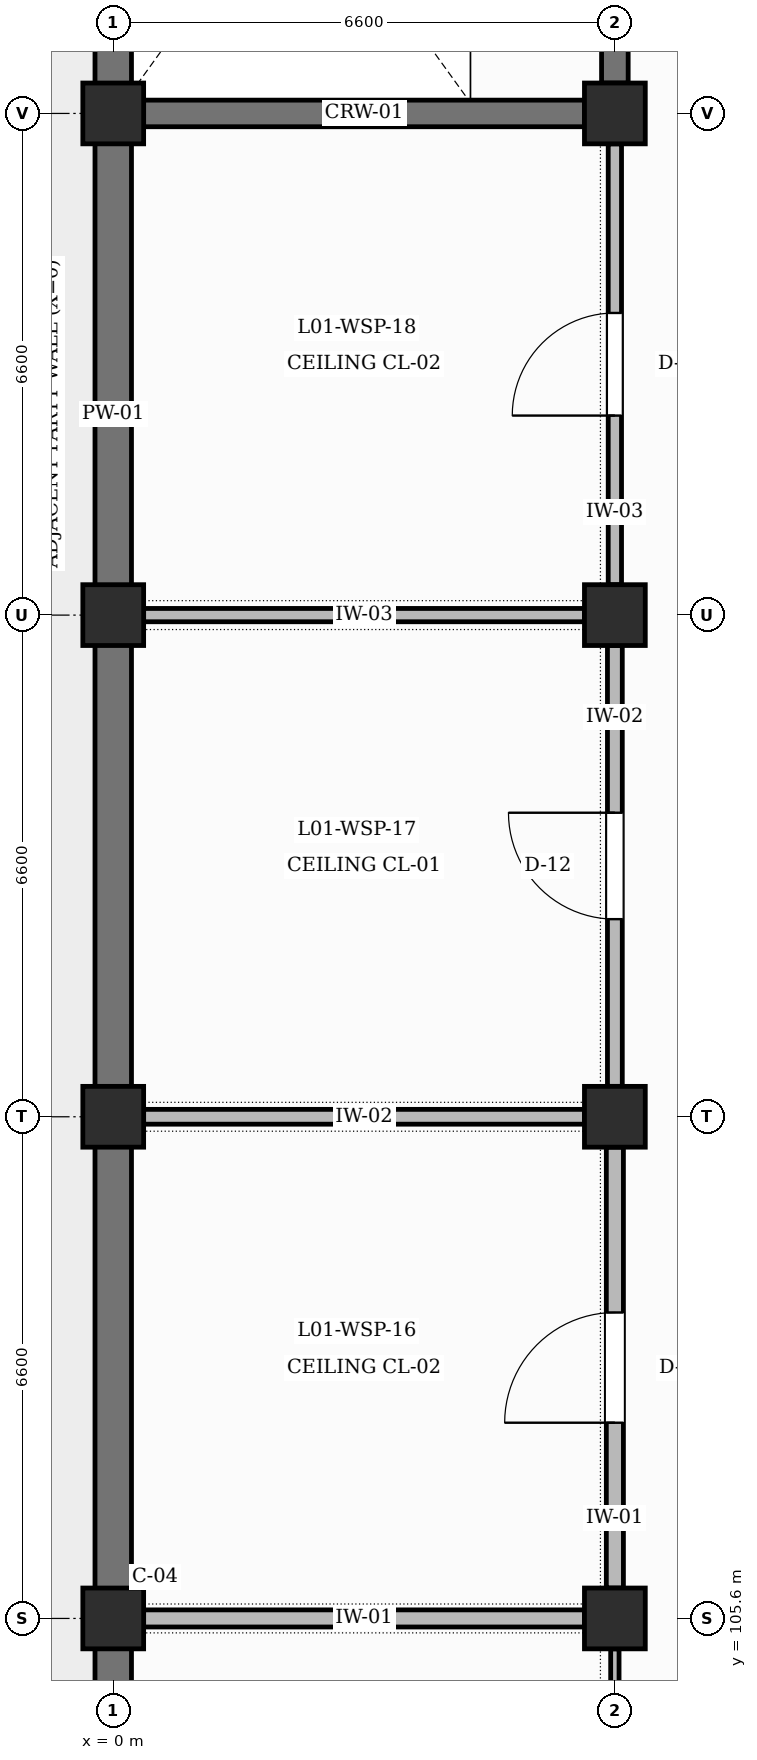
"""IFC4 building model, lengths in metres.
Left out: names, types, materials, properties, quantities, classifications, styles, units other than length and angle.
Written with IfcOpenShell. Run it as: python <this file> out.ifc"""

import sys

from ifc_helpers import new_model, si_unit, direction, frame, frame_2d, origin, origin_2d, place, context, subcontext, project, spatial, rectangle, extrude, element, fill, save


model = new_model("IFC4")
c1 = context("Model", 3, precision=1e-05, world=origin(), true_north=direction((0.0, 1.0)))
c2 = subcontext(c1, "Body", "Model", "MODEL_VIEW")
j1 = project(units=[si_unit("LENGTHUNIT", "METRE"), si_unit("PLANEANGLEUNIT", "RADIAN")], contexts=[c1])
p1 = place(None, origin())
s1 = spatial("IfcSite", under=j1, at=p1, CompositionType="ELEMENT")
p2 = place(p1, origin())
s2 = spatial("IfcBuilding", under=s1, at=p2, CompositionType="ELEMENT")
p3 = place(p2, frame((0.0, 0.0, 5.4)))
s3 = spatial("IfcBuildingStorey", under=s2, at=p3, CompositionType="ELEMENT", Elevation=5.4)
for number, where, z_axis, x_axis in (
    (1, (0.0, 105.6, 0.0), (0.0, 0.0, 1.0), (1.0, 0.0, 0.0)),
    (2, (0.0, 112.2, 0.0), (0.0, 0.0, 1.0), (1.0, 0.0, 0.0)),
    (3, (0.0, 118.8, 0.0), (0.0, 0.0, 1.0), (1.0, 0.0, 0.0)),
    (4, (0.0, 125.4, 0.0), (0.0, 0.0, 1.0), (1.0, 0.0, 0.0)),
    (5, (6.6, 105.6, 0.0), (0.0, 0.0, 1.0), (1.0, 0.0, 0.0)),
    (6, (6.6, 112.2, 0.0), (0.0, 0.0, 1.0), (1.0, 0.0, 0.0)),
    (7, (6.6, 118.8, 0.0), (0.0, 0.0, 1.0), (1.0, 0.0, 0.0)),
    (8, (6.6, 125.4, 0.0), (0.0, 0.0, 1.0), (1.0, 0.0, 0.0)),
):
    element("IfcColumn", number, at=place(p3, frame(where, z_axis=z_axis, x_axis=x_axis)), inside=s3, PredefinedType="COLUMN", context=c2, shape_type="SweptSolid", body=[
        extrude(rectangle(XDim=0.8, YDim=0.8, at=origin_2d()), origin(), (0.0, 0.0, 1.0), 4.8),
    ])
for number, where, z_axis, x_axis in (
    (9, (0.0, 99.4, 0.0), (0.0, 0.0, 1.0), (0.0, 1.0, 0.0)),
    (10, (0.0, 106.0, 0.0), (0.0, 0.0, 1.0), (0.0, 1.0, 0.0)),
):
    element("IfcWall", number, at=place(p3, frame(where, z_axis=z_axis, x_axis=x_axis)), inside=s3, PredefinedType="SOLIDWALL", context=c2, shape_type="SweptSolid", body=[
        extrude(rectangle(XDim=5.8, YDim=0.48, at=frame_2d((2.9, 0.0))), origin(), (0.0, 0.0, 1.0), 3.85),
    ])
p4 = place(p3, frame((0.0, 112.6, 0.0), z_axis=(0.0, 0.0, 1.0), x_axis=(0.0, 1.0, 0.0)))
e11 = element("IfcWall", 11, at=p4, inside=s3, PredefinedType="SOLIDWALL", context=c2, shape_type="SweptSolid", body=[
    extrude(rectangle(XDim=5.8, YDim=0.48, at=frame_2d((2.9, 0.0))), origin(), (0.0, 0.0, 1.0), 3.85),
])
for number, where, z_axis, x_axis in (
    (12, (0.0, 119.2, 0.0), (0.0, 0.0, 1.0), (0.0, 1.0, 0.0)),
    (13, (0.0, 125.8, 0.0), (0.0, 0.0, 1.0), (0.0, 1.0, 0.0)),
):
    element("IfcWall", number, at=place(p3, frame(where, z_axis=z_axis, x_axis=x_axis)), inside=s3, PredefinedType="SOLIDWALL", context=c2, shape_type="SweptSolid", body=[
        extrude(rectangle(XDim=5.8, YDim=0.48, at=frame_2d((2.9, 0.0))), origin(), (0.0, 0.0, 1.0), 3.85),
    ])
p5 = place(p3, frame((0.4, 125.4, 0.0), z_axis=(0.0, 0.0, 1.0), x_axis=(1.0, 0.0, 0.0)))
e14 = element("IfcWall", 14, at=p5, inside=s3, PredefinedType="SHEAR", context=c2, shape_type="SweptSolid", body=[
    extrude(rectangle(XDim=5.8, YDim=0.35, at=frame_2d((2.9, 0.0))), origin(), (0.0, 0.0, 1.0), 3.7),
])
p6 = place(p3, frame((6.6, 125.8, 0.0), z_axis=(0.0, 0.0, 1.0), x_axis=(0.0, 1.0, 0.0)))
e15 = element("IfcWall", 15, at=p6, inside=s3, PredefinedType="SHEAR", context=c2, shape_type="SweptSolid", body=[
    extrude(rectangle(XDim=5.9, YDim=0.35, at=frame_2d((2.95, 0.0))), origin(), (0.0, 0.0, 1.0), 3.7),
])
p7 = place(p6, frame((2.4, 0.0, 0.0)))
e16 = element("IfcOpeningElement", 16, at=p7, cuts=e15, PredefinedType="OPENING", context=c2, shape_type="SweptSolid", body=[
    extrude(rectangle(XDim=1.1, YDim=2.15, at=frame_2d((0.55, 1.075))), frame((0.0, 0.185, 0.0), z_axis=(0.0, -1.0, 0.0), x_axis=(1.0, 0.0, 0.0)), (0.0, 0.0, 1.0), 0.37),
])
p8 = place(p3, frame((6.6, 99.4, 0.0), z_axis=(0.0, 0.0, 1.0), x_axis=(0.0, 1.0, 0.0)))
e17 = element("IfcWall", 17, at=p8, inside=s3, PredefinedType="PARTITIONING", context=c2, shape_type="SweptSolid", body=[
    extrude(rectangle(XDim=5.8, YDim=0.11, at=frame_2d((2.9, 0.0))), origin(), (0.0, 0.0, 1.0), 3.7),
])
p9 = place(p8, frame((2.275, 0.0, 0.0)))
e18 = element("IfcOpeningElement", 18, at=p9, cuts=e17, PredefinedType="OPENING", context=c2, shape_type="SweptSolid", body=[
    extrude(rectangle(XDim=1.25, YDim=2.25, at=frame_2d((0.625, 1.125))), frame((0.0, 0.065, 0.0), z_axis=(0.0, -1.0, 0.0), x_axis=(1.0, 0.0, 0.0)), (0.0, 0.0, 1.0), 0.13),
])
p10 = place(p3, frame((0.4, 105.6, 0.0), z_axis=(0.0, 0.0, 1.0), x_axis=(1.0, 0.0, 0.0)))
e19 = element("IfcWall", 19, at=p10, inside=s3, PredefinedType="PARTITIONING", context=c2, shape_type="SweptSolid", body=[
    extrude(rectangle(XDim=5.8, YDim=0.225, at=frame_2d((2.9, 0.0))), origin(), (0.0, 0.0, 1.0), 3.6),
])
p11 = place(p3, frame((6.6, 106.0, 0.0), z_axis=(0.0, 0.0, 1.0), x_axis=(0.0, 1.0, 0.0)))
e20 = element("IfcWall", 20, at=p11, inside=s3, PredefinedType="PARTITIONING", context=c2, shape_type="SweptSolid", body=[
    extrude(rectangle(XDim=5.8, YDim=0.225, at=frame_2d((2.9, 0.0))), origin(), (0.0, 0.0, 1.0), 3.7),
])
p12 = place(p11, frame((2.175, 0.0, 0.0)))
e21 = element("IfcOpeningElement", 21, at=p12, cuts=e20, PredefinedType="OPENING", context=c2, shape_type="SweptSolid", body=[
    extrude(rectangle(XDim=1.45, YDim=2.25, at=frame_2d((0.725, 1.125))), frame((0.0, 0.123, 0.0), z_axis=(0.0, -1.0, 0.0), x_axis=(1.0, 0.0, 0.0)), (0.0, 0.0, 1.0), 0.245),
])
p13 = place(p3, frame((0.4, 112.2, 0.0), z_axis=(0.0, 0.0, 1.0), x_axis=(1.0, 0.0, 0.0)))
e22 = element("IfcWall", 22, at=p13, inside=s3, PredefinedType="PARTITIONING", context=c2, shape_type="SweptSolid", body=[
    extrude(rectangle(XDim=5.8, YDim=0.195, at=frame_2d((2.9, 0.0))), origin(), (0.0, 0.0, 1.0), 3.7),
])
p14 = place(p3, frame((6.6, 112.6, 0.0), z_axis=(0.0, 0.0, 1.0), x_axis=(0.0, 1.0, 0.0)))
e23 = element("IfcWall", 23, at=p14, inside=s3, PredefinedType="PARTITIONING", context=c2, shape_type="SweptSolid", body=[
    extrude(rectangle(XDim=5.8, YDim=0.195, at=frame_2d((2.9, 0.0))), origin(), (0.0, 0.0, 1.0), 3.7),
])
p15 = place(p14, frame((2.2, 0.0, 0.0)))
e24 = element("IfcOpeningElement", 24, at=p15, cuts=e23, PredefinedType="OPENING", context=c2, shape_type="SweptSolid", body=[
    extrude(rectangle(XDim=1.4, YDim=2.25, at=frame_2d((0.7, 1.125))), frame((0.0, 0.107, 0.0), z_axis=(0.0, -1.0, 0.0), x_axis=(1.0, 0.0, 0.0)), (0.0, 0.0, 1.0), 0.215),
])
p16 = place(p3, frame((0.4, 118.8, 0.0), z_axis=(0.0, 0.0, 1.0), x_axis=(1.0, 0.0, 0.0)))
e25 = element("IfcWall", 25, at=p16, inside=s3, PredefinedType="PARTITIONING", context=c2, shape_type="SweptSolid", body=[
    extrude(rectangle(XDim=5.8, YDim=0.175, at=frame_2d((2.9, 0.0))), origin(), (0.0, 0.0, 1.0), 3.6),
])
p17 = place(p3, frame((6.6, 119.2, 0.0), z_axis=(0.0, 0.0, 1.0), x_axis=(0.0, 1.0, 0.0)))
e26 = element("IfcWall", 26, at=p17, inside=s3, PredefinedType="PARTITIONING", context=c2, shape_type="SweptSolid", body=[
    extrude(rectangle(XDim=5.8, YDim=0.175, at=frame_2d((2.9, 0.0))), origin(), (0.0, 0.0, 1.0), 3.7),
])
p18 = place(p17, frame((2.225, 0.0, 0.0)))
e27 = element("IfcOpeningElement", 27, at=p18, cuts=e26, PredefinedType="OPENING", context=c2, shape_type="SweptSolid", body=[
    extrude(rectangle(XDim=1.35, YDim=2.3, at=frame_2d((0.675, 1.15))), frame((0.0, 0.097, 0.0), z_axis=(0.0, -1.0, 0.0), x_axis=(1.0, 0.0, 0.0)), (0.0, 0.0, 1.0), 0.195),
])
p19 = place(p12, origin())
e28 = element("IfcDoor", 28, at=p19, inside=s3, OperationType="SINGLE_SWING_LEFT", PredefinedType="DOOR", context=c2, shape_type="SweptSolid", body=[
    extrude(rectangle(XDim=1.45, YDim=2.25, at=frame_2d((0.725, 1.125))), frame((0.0, 0.025, 0.0), z_axis=(0.0, -1.0, 0.0), x_axis=(1.0, 0.0, 0.0)), (0.0, 0.0, 1.0), 0.05),
])
fill(e21, e28)
p20 = place(p15, origin())
e29 = element("IfcDoor", 29, at=p20, inside=s3, OperationType="SINGLE_SWING_RIGHT", PredefinedType="DOOR", context=c2, shape_type="SweptSolid", body=[
    extrude(rectangle(XDim=1.4, YDim=2.25, at=frame_2d((0.7, 1.125))), frame((0.0, 0.025, 0.0), z_axis=(0.0, -1.0, 0.0), x_axis=(1.0, 0.0, 0.0)), (0.0, 0.0, 1.0), 0.05),
])
fill(e24, e29)
p21 = place(p18, origin())
e30 = element("IfcDoor", 30, at=p21, inside=s3, OperationType="SINGLE_SWING_LEFT", PredefinedType="DOOR", context=c2, shape_type="SweptSolid", body=[
    extrude(rectangle(XDim=1.35, YDim=2.3, at=frame_2d((0.675, 1.15))), frame((0.0, 0.025, 0.0), z_axis=(0.0, -1.0, 0.0), x_axis=(1.0, 0.0, 0.0)), (0.0, 0.0, 1.0), 0.05),
])
fill(e27, e30)
save(model, sys.argv[1])
